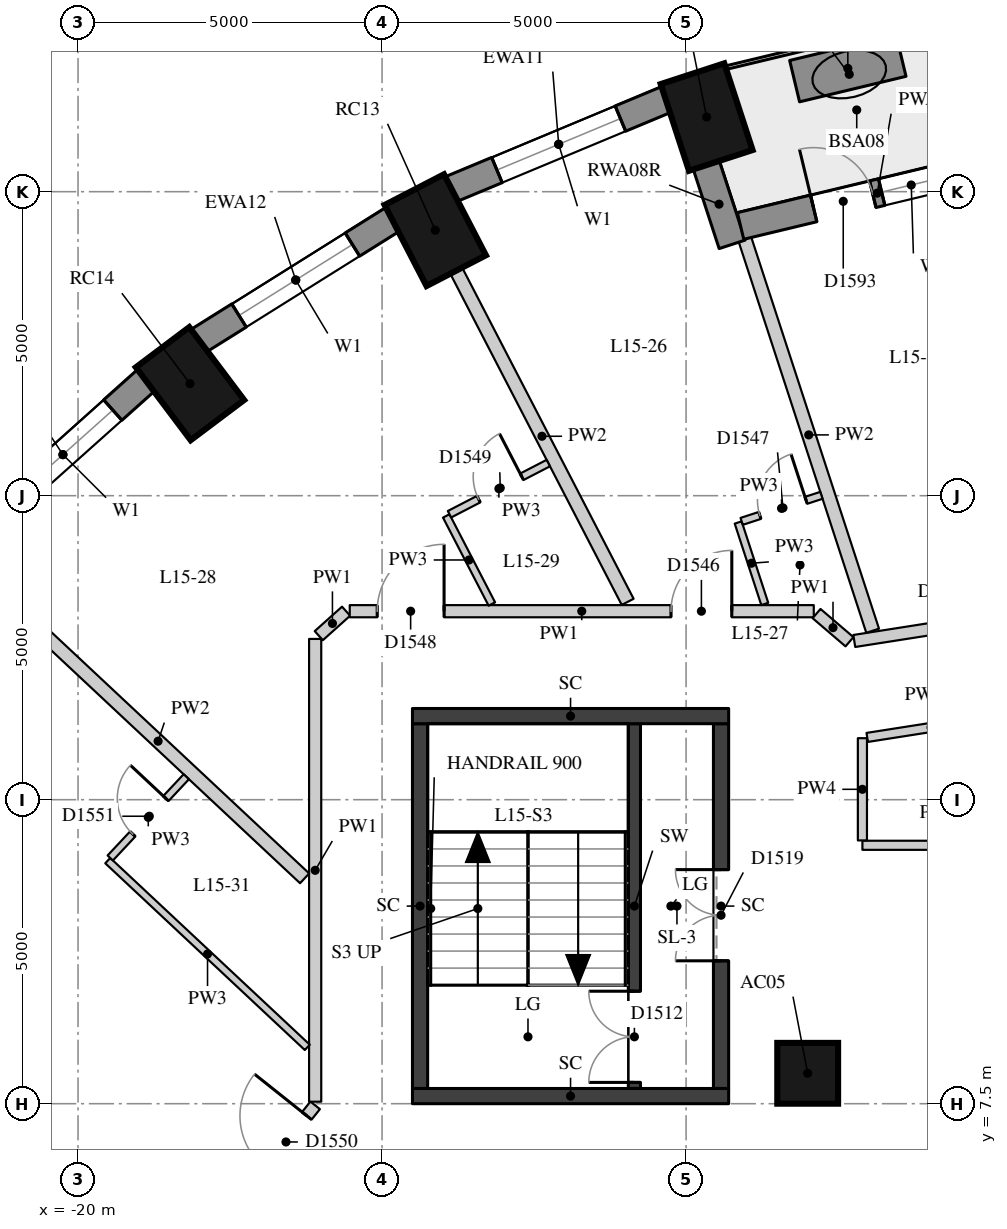
"""IFC4 building model, lengths in metres.
Left out: names, types, materials, properties, quantities, classifications, styles, units other than length and angle.
Written with IfcOpenShell. Run it as: python <this file> out.ifc"""

import sys

from ifc_helpers import new_model, si_unit, direction, frame, frame_2d, origin, origin_2d, place, context, subcontext, project, spatial, rectangle, extrude, element, fill, save


model = new_model("IFC4")
c1 = context("Model", 3, precision=1e-05, world=origin(), true_north=direction((0.0, 1.0)))
c2 = subcontext(c1, "Body", "Model", "MODEL_VIEW")
j1 = project(units=[si_unit("LENGTHUNIT", "METRE"), si_unit("PLANEANGLEUNIT", "RADIAN")], contexts=[c1])
p1 = place(None, origin())
s1 = spatial("IfcSite", under=j1, at=p1, CompositionType="ELEMENT")
p2 = place(p1, origin())
s2 = spatial("IfcBuilding", under=s1, at=p2, CompositionType="ELEMENT")
p3 = place(p2, frame((0.0, 0.0, 58.0)))
s3 = spatial("IfcBuildingStorey", under=s2, at=p3, CompositionType="ELEMENT", Elevation=58.0)
for number, where, z_axis, x_axis in (
    (1, (-9.662, 23.727, 0.0), (0.0, 0.0, 1.0), (-0.31, 0.951, 0.0)),
    (2, (-14.125, 21.867, 0.0), (0.0, 0.0, 1.0), (-0.46, 0.888, 0.0)),
    (3, (-18.159, 19.343, 0.0), (0.0, 0.0, 1.0), (-0.601, 0.799, 0.0)),
):
    element("IfcColumn", number, at=place(p3, frame(where, z_axis=z_axis, x_axis=x_axis)), inside=s3, PredefinedType="COLUMN", context=c2, shape_type="SweptSolid", body=[
        extrude(rectangle(XDim=1.5, YDim=1.1, at=origin_2d()), origin(), (0.0, 0.0, 1.0), 3.3),
    ])
p4 = place(p3, frame((-8.0, 8.0, 0.0), z_axis=(0.0, 0.0, 1.0), x_axis=(1.0, 0.0, 0.0)))
e4 = element("IfcColumn", 4, at=p4, inside=s3, PredefinedType="COLUMN", context=c2, shape_type="SweptSolid", body=[
    extrude(rectangle(XDim=1.0, YDim=1.0, at=origin_2d()), origin(), (0.0, 0.0, 1.0), 3.3),
])
p5 = place(p3, frame((-10.315, 24.021, 0.0), z_axis=(0.0, 0.0, 1.0), x_axis=(-0.923031964282, -0.384723267966, 0.0)))
e5 = element("IfcWall", 5, at=p5, inside=s3, PredefinedType="SOLIDWALL", context=c2, shape_type="SweptSolid", body=[
    extrude(rectangle(XDim=3.856, YDim=0.45, at=frame_2d((1.928, 0.0))), origin(), (0.0, 0.0, 1.0), 3.02),
])
p6 = place(p5, frame((0.828, 0.0, 0.4)))
e6 = element("IfcOpeningElement", 6, at=p6, cuts=e5, PredefinedType="OPENING", context=c2, shape_type="SweptSolid", body=[
    extrude(rectangle(XDim=2.2, YDim=1.75, at=frame_2d((1.1, 0.875))), frame((0.0, 0.235, 0.0), z_axis=(0.0, -1.0, 0.0), x_axis=(1.0, 0.0, 0.0)), (0.0, 0.0, 1.0), 0.47),
])
p7 = place(p3, frame((-14.817, 22.051, 0.0), z_axis=(0.0, 0.0, 1.0), x_axis=(-0.847635480093, -0.530579016629, 0.0)))
e7 = element("IfcWall", 7, at=p7, inside=s3, PredefinedType="SOLIDWALL", context=c2, shape_type="SweptSolid", body=[
    extrude(rectangle(XDim=3.782, YDim=0.45, at=frame_2d((1.891, 0.0))), origin(), (0.0, 0.0, 1.0), 3.02),
])
p8 = place(p7, frame((0.791, 0.0, 0.4)))
e8 = element("IfcOpeningElement", 8, at=p8, cuts=e7, PredefinedType="OPENING", context=c2, shape_type="SweptSolid", body=[
    extrude(rectangle(XDim=2.2, YDim=1.75, at=frame_2d((1.1, 0.875))), frame((0.0, 0.235, 0.0), z_axis=(0.0, -1.0, 0.0), x_axis=(1.0, 0.0, 0.0)), (0.0, 0.0, 1.0), 0.47),
])
p9 = place(p3, frame((-18.871, 19.407, 0.0), z_axis=(0.0, 0.0, 1.0), x_axis=(-0.745526233716, -0.66647628228, 0.0)))
e9 = element("IfcWall", 9, at=p9, inside=s3, PredefinedType="SOLIDWALL", context=c2, shape_type="SweptSolid", body=[
    extrude(rectangle(XDim=3.697, YDim=0.45, at=frame_2d((1.848, 0.0))), origin(), (0.0, 0.0, 1.0), 3.02),
])
p10 = place(p9, frame((0.749, 0.0, 0.4)))
e10 = element("IfcOpeningElement", 10, at=p10, cuts=e9, PredefinedType="OPENING", context=c2, shape_type="SweptSolid", body=[
    extrude(rectangle(XDim=2.2, YDim=1.75, at=frame_2d((1.1, 0.875))), frame((0.0, 0.235, 0.0), z_axis=(0.0, -1.0, 0.0), x_axis=(1.0, 0.0, 0.0)), (0.0, 0.0, 1.0), 0.47),
])
p11 = place(p3, frame((-9.674, 22.956, 0.0), z_axis=(0.0, 0.0, 1.0), x_axis=(0.310269011655, -0.950648799719, 0.0)))
e11 = element("IfcWall", 11, at=p11, inside=s3, PredefinedType="SOLIDWALL", context=c2, shape_type="SweptSolid", body=[
    extrude(rectangle(XDim=1.39, YDim=0.45, at=frame_2d((0.695, 0.0))), origin(), (0.0, 0.0, 1.0), 3.02),
])
p12 = place(p3, frame((-4.608, 23.016, 0.0), z_axis=(0.0, 0.0, 1.0), x_axis=(-0.972343667289, -0.233554688847, 0.0)))
e12 = element("IfcWall", 12, at=p12, inside=s3, PredefinedType="SOLIDWALL", context=c2, shape_type="SweptSolid", body=[
    extrude(rectangle(XDim=4.624, YDim=0.45, at=frame_2d((2.312, 0.0))), origin(), (0.0, 0.0, 1.0), 3.02),
])
p13 = place(p12, frame((1.237, 0.0, 0.4)))
e13 = element("IfcOpeningElement", 13, at=p13, cuts=e12, PredefinedType="OPENING", context=c2, shape_type="SweptSolid", body=[
    extrude(rectangle(XDim=1.0, YDim=1.75, at=frame_2d((0.5, 0.875))), frame((0.0, 0.235, 0.0), z_axis=(0.0, -1.0, 0.0), x_axis=(1.0, 0.0, 0.0)), (0.0, 0.0, 1.0), 0.47),
])
p14 = place(p12, frame((2.387, 0.0, 0.0)))
e14 = element("IfcOpeningElement", 14, at=p14, cuts=e12, PredefinedType="OPENING", context=c2, shape_type="SweptSolid", body=[
    extrude(rectangle(XDim=1.0, YDim=2.15, at=frame_2d((0.5, 1.075))), frame((0.0, 0.235, 0.0), z_axis=(0.0, -1.0, 0.0), x_axis=(1.0, 0.0, 0.0)), (0.0, 0.0, 1.0), 0.47),
])
p15 = place(p3, frame((-6.465, 24.737, 0.0), z_axis=(0.0, 0.0, 1.0), x_axis=(-0.972504142103, -0.232885580473, 0.0)))
e15 = element("IfcWall", 15, at=p15, inside=s3, PredefinedType="USERDEFINED", context=c2, shape_type="SweptSolid", body=[
    extrude(rectangle(XDim=1.8, YDim=0.7, at=frame_2d((0.9, 0.0))), origin(), (0.0, 0.0, 1.0), 0.75),
])
p16 = place(p3, frame((-10.85, 7.75, 0.0), z_axis=(0.0, 0.0, 1.0), x_axis=(0.0, 1.0, 0.0)))
e16 = element("IfcWall", 16, at=p16, inside=s3, PredefinedType="SHEAR", context=c2, shape_type="SweptSolid", body=[
    extrude(rectangle(XDim=6.0, YDim=0.2, at=frame_2d((3.0, 0.0))), origin(), (0.0, 0.0, 1.0), 3.02),
])
p17 = place(p16, frame((0.1, 0.0, 0.0)))
e17 = element("IfcOpeningElement", 17, at=p17, cuts=e16, PredefinedType="OPENING", context=c2, shape_type="SweptSolid", body=[
    extrude(rectangle(XDim=1.5, YDim=2.1, at=frame_2d((0.75, 1.05))), frame((0.0, 0.11, 0.0), z_axis=(0.0, -1.0, 0.0), x_axis=(1.0, 0.0, 0.0)), (0.0, 0.0, 1.0), 0.22),
])
p18 = place(p3, frame((-14.375, 7.75, -0.28), z_axis=(0.0, 0.0, 1.0), x_axis=(0.0, 1.0, 0.0)))
e18 = element("IfcWall", 18, at=p18, inside=s3, PredefinedType="SHEAR", context=c2, shape_type="SweptSolid", body=[
    extrude(rectangle(XDim=6.0, YDim=0.25, at=frame_2d((3.0, 0.0))), origin(), (0.0, 0.0, 1.0), 3.3),
])
p19 = place(p3, frame((-9.425, 7.75, -0.28), z_axis=(0.0, 0.0, 1.0), x_axis=(0.0, 1.0, 0.0)))
e19 = element("IfcWall", 19, at=p19, inside=s3, PredefinedType="SHEAR", context=c2, shape_type="SweptSolid", body=[
    extrude(rectangle(XDim=6.0, YDim=0.25, at=frame_2d((3.0, 0.0))), origin(), (0.0, 0.0, 1.0), 3.3),
])
p20 = place(p19, frame((2.1, 0.0, 0.28)))
e20 = element("IfcOpeningElement", 20, at=p20, cuts=e19, PredefinedType="OPENING", context=c2, shape_type="SweptSolid", body=[
    extrude(rectangle(XDim=1.5, YDim=2.1, at=frame_2d((0.75, 1.05))), frame((0.0, 0.135, 0.0), z_axis=(0.0, -1.0, 0.0), x_axis=(1.0, 0.0, 0.0)), (0.0, 0.0, 1.0), 0.27),
])
for number, where, z_axis, x_axis in (
    (21, (-14.5, 13.875, -0.28), (0.0, 0.0, 1.0), (1.0, 0.0, 0.0)),
    (22, (-14.5, 7.625, -0.28), (0.0, 0.0, 1.0), (1.0, 0.0, 0.0)),
):
    element("IfcWall", number, at=place(p3, frame(where, z_axis=z_axis, x_axis=x_axis)), inside=s3, PredefinedType="SHEAR", context=c2, shape_type="SweptSolid", body=[
        extrude(rectangle(XDim=5.2, YDim=0.25, at=frame_2d((2.6, 0.0))), origin(), (0.0, 0.0, 1.0), 3.3),
    ])
p21 = place(p3, frame((-19.789, 2.844, 0.0), z_axis=(0.0, 0.0, 1.0), x_axis=(0.623300670662, 0.781982272147, 0.0)))
e23 = element("IfcWall", 23, at=p21, inside=s3, PredefinedType="PARTITIONING", context=c2, shape_type="SweptSolid", body=[
    extrude(rectangle(XDim=5.919, YDim=0.2, at=frame_2d((2.959, 0.0))), origin(), (0.0, 0.0, 1.0), 3.02),
])
p22 = place(p21, frame((4.599, 0.0, 0.0)))
e24 = element("IfcOpeningElement", 24, at=p22, cuts=e23, PredefinedType="OPENING", context=c2, shape_type="SweptSolid", body=[
    extrude(rectangle(XDim=1.1, YDim=2.1, at=frame_2d((0.55, 1.05))), frame((0.0, 0.11, 0.0), z_axis=(0.0, -1.0, 0.0), x_axis=(1.0, 0.0, 0.0)), (0.0, 0.0, 1.0), 0.22),
])
p23 = place(p3, frame((-16.1, 7.533, 0.0), z_axis=(0.0, 0.0, 1.0), x_axis=(0.0, 1.0, 0.0)))
e25 = element("IfcWall", 25, at=p23, inside=s3, PredefinedType="PARTITIONING", context=c2, shape_type="SweptSolid", body=[
    extrude(rectangle(XDim=7.611, YDim=0.2, at=frame_2d((3.806, 0.0))), origin(), (0.0, 0.0, 1.0), 3.02),
])
p24 = place(p3, frame((-16.041, 15.198, 0.0), z_axis=(0.0, 0.0, 1.0), x_axis=(0.744722115519, 0.667374685359, 0.0)))
e26 = element("IfcWall", 26, at=p24, inside=s3, PredefinedType="PARTITIONING", context=c2, shape_type="SweptSolid", body=[
    extrude(rectangle(XDim=0.603, YDim=0.2, at=frame_2d((0.301, 0.0))), origin(), (0.0, 0.0, 1.0), 3.02),
])
p25 = place(p3, frame((-15.531, 15.6, 0.0), z_axis=(0.0, 0.0, 1.0), x_axis=(1.0, 0.0, 0.0)))
e27 = element("IfcWall", 27, at=p25, inside=s3, PredefinedType="PARTITIONING", context=c2, shape_type="SweptSolid", body=[
    extrude(rectangle(XDim=7.632, YDim=0.2, at=frame_2d((3.816, 0.0))), origin(), (0.0, 0.0, 1.0), 3.02),
])
p26 = place(p25, frame((5.283, 0.0, 0.0)))
e28 = element("IfcOpeningElement", 28, at=p26, cuts=e27, PredefinedType="OPENING", context=c2, shape_type="SweptSolid", body=[
    extrude(rectangle(XDim=1.0, YDim=2.1, at=frame_2d((0.5, 1.05))), frame((0.0, 0.11, 0.0), z_axis=(0.0, -1.0, 0.0), x_axis=(1.0, 0.0, 0.0)), (0.0, 0.0, 1.0), 0.22),
])
p27 = place(p25, frame((0.451, 0.0, 0.0)))
e29 = element("IfcOpeningElement", 29, at=p27, cuts=e27, PredefinedType="OPENING", context=c2, shape_type="SweptSolid", body=[
    extrude(rectangle(XDim=1.1, YDim=2.1, at=frame_2d((0.55, 1.05))), frame((0.0, 0.11, 0.0), z_axis=(0.0, -1.0, 0.0), x_axis=(1.0, 0.0, 0.0)), (0.0, 0.0, 1.0), 0.22),
])
p28 = place(p3, frame((-7.854, 15.561, 0.0), z_axis=(0.0, 0.0, 1.0), x_axis=(0.759763914627, -0.650199041856, 0.0)))
e30 = element("IfcWall", 30, at=p28, inside=s3, PredefinedType="PARTITIONING", context=c2, shape_type="SweptSolid", body=[
    extrude(rectangle(XDim=0.713, YDim=0.2, at=frame_2d((0.356, 0.0))), origin(), (0.0, 0.0, 1.0), 3.02),
])
p29 = place(p3, frame((-7.234, 15.11, 0.0), z_axis=(0.0, 0.0, 1.0), x_axis=(0.987957763282, 0.154723811906, 0.0)))
e31 = element("IfcWall", 31, at=p29, inside=s3, PredefinedType="PARTITIONING", context=c2, shape_type="SweptSolid", body=[
    extrude(rectangle(XDim=11.012, YDim=0.2, at=frame_2d((5.506, 0.0))), origin(), (0.0, 0.0, 1.0), 3.02),
])
p30 = place(p29, frame((8.605, 0.0, 0.0)))
e32 = element("IfcOpeningElement", 32, at=p30, cuts=e31, PredefinedType="OPENING", context=c2, shape_type="SweptSolid", body=[
    extrude(rectangle(XDim=0.9, YDim=2.1, at=frame_2d((0.45, 1.05))), frame((0.0, 0.11, 0.0), z_axis=(0.0, -1.0, 0.0), x_axis=(1.0, 0.0, 0.0)), (0.0, 0.0, 1.0), 0.22),
])
p31 = place(p29, frame((5.116, 0.0, 0.0)))
e33 = element("IfcOpeningElement", 33, at=p31, cuts=e31, PredefinedType="OPENING", context=c2, shape_type="SweptSolid", body=[
    extrude(rectangle(XDim=0.9, YDim=2.1, at=frame_2d((0.45, 1.05))), frame((0.0, 0.11, 0.0), z_axis=(0.0, -1.0, 0.0), x_axis=(1.0, 0.0, 0.0)), (0.0, 0.0, 1.0), 0.22),
])
p32 = place(p29, frame((1.626, 0.0, 0.0)))
e34 = element("IfcOpeningElement", 34, at=p32, cuts=e31, PredefinedType="OPENING", context=c2, shape_type="SweptSolid", body=[
    extrude(rectangle(XDim=0.9, YDim=2.1, at=frame_2d((0.45, 1.05))), frame((0.0, 0.11, 0.0), z_axis=(0.0, -1.0, 0.0), x_axis=(1.0, 0.0, 0.0)), (0.0, 0.0, 1.0), 0.22),
])
p33 = place(p3, frame((-4.58, 11.75, 0.0), z_axis=(0.0, 0.0, 1.0), x_axis=(-1.0, 0.0, 0.0)))
e35 = element("IfcWall", 35, at=p33, inside=s3, PredefinedType="PARTITIONING", context=c2, shape_type="SweptSolid", body=[
    extrude(rectangle(XDim=2.52, YDim=0.15, at=frame_2d((1.26, 0.0))), origin(), (0.0, 0.0, 1.0), 3.02),
])
p34 = place(p3, frame((-7.1, 11.83, 0.0), z_axis=(0.0, 0.0, 1.0), x_axis=(0.0, 1.0, 0.0)))
e36 = element("IfcWall", 36, at=p34, inside=s3, PredefinedType="PARTITIONING", context=c2, shape_type="SweptSolid", body=[
    extrude(rectangle(XDim=1.681, YDim=0.15, at=frame_2d((0.841, 0.0))), origin(), (0.0, 0.0, 1.0), 3.02),
])
p35 = place(p3, frame((-7.021, 13.524, 0.0), z_axis=(0.0, 0.0, 1.0), x_axis=(0.987976394461, 0.154604799366, 0.0)))
e37 = element("IfcWall", 37, at=p35, inside=s3, PredefinedType="PARTITIONING", context=c2, shape_type="SweptSolid", body=[
    extrude(rectangle(XDim=2.124, YDim=0.15, at=frame_2d((1.062, 0.0))), origin(), (0.0, 0.0, 1.0), 2.57),
])
p36 = place(p3, frame((-9.034, 21.721, 0.0), z_axis=(0.0, 0.0, 1.0), x_axis=(0.310212430052, -0.950667264736, 0.0)))
e38 = element("IfcWall", 38, at=p36, inside=s3, PredefinedType="PARTITIONING", context=c2, shape_type="SweptSolid", body=[
    extrude(rectangle(XDim=6.777, YDim=0.22, at=frame_2d((3.388, 0.0))), origin(), (0.0, 0.0, 1.0), 3.02),
])
p37 = place(p3, frame((-13.78, 21.201, 0.0), z_axis=(0.0, 0.0, 1.0), x_axis=(0.459699000582, -0.888074787878, 0.0)))
e39 = element("IfcWall", 39, at=p37, inside=s3, PredefinedType="PARTITIONING", context=c2, shape_type="SweptSolid", body=[
    extrude(rectangle(XDim=6.134, YDim=0.22, at=frame_2d((3.067, 0.0))), origin(), (0.0, 0.0, 1.0), 3.02),
])
p38 = place(p3, frame((-21.093, 15.718, 0.0), z_axis=(0.0, 0.0, 1.0), x_axis=(0.73009284205, -0.683347965525, 0.0)))
e40 = element("IfcWall", 40, at=p38, inside=s3, PredefinedType="PARTITIONING", context=c2, shape_type="SweptSolid", body=[
    extrude(rectangle(XDim=6.602, YDim=0.22, at=frame_2d((3.301, 0.0))), origin(), (0.0, 0.0, 1.0), 3.02),
])
p39 = place(p3, frame((-8.706, 15.719, 0.0), z_axis=(0.0, 0.0, 1.0), x_axis=(-0.310245242974, 0.950656556918, 0.0)))
e41 = element("IfcWall", 41, at=p39, inside=s3, PredefinedType="PARTITIONING", context=c2, shape_type="SweptSolid", body=[
    extrude(rectangle(XDim=1.409, YDim=0.12, at=frame_2d((0.705, 0.0))), origin(), (0.0, 0.0, 1.0), 3.02),
])
p40 = place(p3, frame((-13.194, 15.718, 0.0), z_axis=(0.0, 0.0, 1.0), x_axis=(-0.459736274936, 0.888055492359, 0.0)))
e42 = element("IfcWall", 42, at=p40, inside=s3, PredefinedType="PARTITIONING", context=c2, shape_type="SweptSolid", body=[
    extrude(rectangle(XDim=1.632, YDim=0.12, at=frame_2d((0.816, 0.0))), origin(), (0.0, 0.0, 1.0), 3.02),
])
p41 = place(p3, frame((-16.229, 8.426, 0.0), z_axis=(0.0, 0.0, 1.0), x_axis=(-0.730077325201, 0.683364543438, 0.0)))
e43 = element("IfcWall", 43, at=p41, inside=s3, PredefinedType="PARTITIONING", context=c2, shape_type="SweptSolid", body=[
    extrude(rectangle(XDim=4.495, YDim=0.12, at=frame_2d((2.247, 0.0))), origin(), (0.0, 0.0, 1.0), 3.02),
])
p42 = place(p3, frame((-9.086, 17.077, 0.0), z_axis=(0.0, 0.0, 1.0), x_axis=(0.950576687533, 0.310489872812, 0.0)))
e44 = element("IfcWall", 44, at=p42, inside=s3, PredefinedType="PARTITIONING", context=c2, shape_type="SweptSolid", body=[
    extrude(rectangle(XDim=1.38, YDim=0.12, at=frame_2d((0.69, 0.0))), origin(), (0.0, 0.0, 1.0), 3.02),
])
p43 = place(p42, frame((0.315, 0.0, 0.0)))
e45 = element("IfcOpeningElement", 45, at=p43, cuts=e44, PredefinedType="OPENING", context=c2, shape_type="SweptSolid", body=[
    extrude(rectangle(XDim=0.8, YDim=2.1, at=frame_2d((0.4, 1.05))), frame((0.0, 0.07, 0.0), z_axis=(0.0, -1.0, 0.0), x_axis=(1.0, 0.0, 0.0)), (0.0, 0.0, 1.0), 0.14),
])
p44 = place(p3, frame((-13.891, 17.195, 0.0), z_axis=(0.0, 0.0, 1.0), x_axis=(0.88806930088, 0.459709600546, 0.0)))
e46 = element("IfcWall", 46, at=p44, inside=s3, PredefinedType="PARTITIONING", context=c2, shape_type="SweptSolid", body=[
    extrude(rectangle(XDim=1.83, YDim=0.12, at=frame_2d((0.915, 0.0))), origin(), (0.0, 0.0, 1.0), 3.02),
])
p45 = place(p44, frame((0.54, 0.0, 0.0)))
e47 = element("IfcOpeningElement", 47, at=p45, cuts=e46, PredefinedType="OPENING", context=c2, shape_type="SweptSolid", body=[
    extrude(rectangle(XDim=0.8, YDim=2.1, at=frame_2d((0.4, 1.05))), frame((0.0, 0.07, 0.0), z_axis=(0.0, -1.0, 0.0), x_axis=(1.0, 0.0, 0.0)), (0.0, 0.0, 1.0), 0.14),
])
p46 = place(p3, frame((-19.47, 11.542, 0.0), z_axis=(0.0, 0.0, 1.0), x_axis=(0.683306289544, 0.730131847456, 0.0)))
e48 = element("IfcWall", 48, at=p46, inside=s3, PredefinedType="PARTITIONING", context=c2, shape_type="SweptSolid", body=[
    extrude(rectangle(XDim=1.83, YDim=0.12, at=frame_2d((0.915, 0.0))), origin(), (0.0, 0.0, 1.0), 3.02),
])
p47 = place(p46, frame((0.54, 0.0, 0.0)))
e49 = element("IfcOpeningElement", 49, at=p47, cuts=e48, PredefinedType="OPENING", context=c2, shape_type="SweptSolid", body=[
    extrude(rectangle(XDim=0.8, YDim=2.1, at=frame_2d((0.4, 1.05))), frame((0.0, 0.07, 0.0), z_axis=(0.0, -1.0, 0.0), x_axis=(1.0, 0.0, 0.0)), (0.0, 0.0, 1.0), 0.14),
])
p48 = place(p6, origin())
e50 = element("IfcWindow", 50, at=p48, inside=s3, PartitioningType="SINGLE_PANEL", PredefinedType="WINDOW", context=c2, shape_type="SweptSolid", body=[
    extrude(rectangle(XDim=2.2, YDim=1.75, at=frame_2d((1.1, 0.875))), frame((0.0, 0.035, 0.0), z_axis=(0.0, -1.0, 0.0), x_axis=(1.0, 0.0, 0.0)), (0.0, 0.0, 1.0), 0.06),
])
fill(e6, e50)
p49 = place(p8, origin())
e51 = element("IfcWindow", 51, at=p49, inside=s3, PartitioningType="SINGLE_PANEL", PredefinedType="WINDOW", context=c2, shape_type="SweptSolid", body=[
    extrude(rectangle(XDim=2.2, YDim=1.75, at=frame_2d((1.1, 0.875))), frame((0.0, 0.035, 0.0), z_axis=(0.0, -1.0, 0.0), x_axis=(1.0, 0.0, 0.0)), (0.0, 0.0, 1.0), 0.06),
])
fill(e8, e51)
p50 = place(p10, origin())
e52 = element("IfcWindow", 52, at=p50, inside=s3, PartitioningType="SINGLE_PANEL", PredefinedType="WINDOW", context=c2, shape_type="SweptSolid", body=[
    extrude(rectangle(XDim=2.2, YDim=1.75, at=frame_2d((1.1, 0.875))), frame((0.0, 0.035, 0.0), z_axis=(0.0, -1.0, 0.0), x_axis=(1.0, 0.0, 0.0)), (0.0, 0.0, 1.0), 0.06),
])
fill(e10, e52)
p51 = place(p13, origin())
e53 = element("IfcWindow", 53, at=p51, inside=s3, PartitioningType="SINGLE_PANEL", PredefinedType="WINDOW", context=c2, shape_type="SweptSolid", body=[
    extrude(rectangle(XDim=1.0, YDim=1.75, at=frame_2d((0.5, 0.875))), frame((0.0, 0.035, 0.0), z_axis=(0.0, -1.0, 0.0), x_axis=(1.0, 0.0, 0.0)), (0.0, 0.0, 1.0), 0.06),
])
fill(e13, e53)
p52 = place(p14, frame((1.0, 0.0, 0.0), z_axis=(0.0, 0.0, 1.0), x_axis=(-1.0, 0.0, 0.0)))
e54 = element("IfcDoor", 54, at=p52, inside=s3, OperationType="SINGLE_SWING_LEFT", PredefinedType="DOOR", context=c2, shape_type="SweptSolid", body=[
    extrude(rectangle(XDim=1.0, YDim=2.15, at=frame_2d((0.5, 1.075))), frame((0.0, 0.075, 0.0), z_axis=(0.0, -1.0, 0.0), x_axis=(1.0, 0.0, 0.0)), (0.0, 0.0, 1.0), 0.05),
])
fill(e14, e54)
p53 = place(p17, origin())
e55 = element("IfcDoor", 55, at=p53, inside=s3, OperationType="DOUBLE_DOOR_SINGLE_SWING", PredefinedType="DOOR", context=c2, shape_type="SweptSolid", body=[
    extrude(rectangle(XDim=1.5, YDim=2.1, at=frame_2d((0.75, 1.05))), frame((0.0, 0.025, 0.0), z_axis=(0.0, -1.0, 0.0), x_axis=(1.0, 0.0, 0.0)), (0.0, 0.0, 1.0), 0.05),
])
fill(e17, e55)
p54 = place(p20, origin())
e56 = element("IfcDoor", 56, at=p54, inside=s3, OperationType="DOUBLE_DOOR_SINGLE_SWING", PredefinedType="DOOR", context=c2, shape_type="SweptSolid", body=[
    extrude(rectangle(XDim=1.5, YDim=2.1, at=frame_2d((0.75, 1.05))), frame((0.0, 0.025, 0.0), z_axis=(0.0, -1.0, 0.0), x_axis=(1.0, 0.0, 0.0)), (0.0, 0.0, 1.0), 0.05),
])
fill(e20, e56)
p55 = place(p26, origin())
e57 = element("IfcDoor", 57, at=p55, inside=s3, OperationType="SINGLE_SWING_RIGHT", PredefinedType="DOOR", context=c2, shape_type="SweptSolid", body=[
    extrude(rectangle(XDim=1.0, YDim=2.1, at=frame_2d((0.5, 1.05))), frame((0.0, 0.025, 0.0), z_axis=(0.0, -1.0, 0.0), x_axis=(1.0, 0.0, 0.0)), (0.0, 0.0, 1.0), 0.05),
])
fill(e28, e57)
p56 = place(p43, origin())
e58 = element("IfcDoor", 58, at=p56, inside=s3, OperationType="SINGLE_SWING_RIGHT", PredefinedType="DOOR", context=c2, shape_type="SweptSolid", body=[
    extrude(rectangle(XDim=0.8, YDim=2.1, at=frame_2d((0.4, 1.05))), frame((0.0, 0.025, 0.0), z_axis=(0.0, -1.0, 0.0), x_axis=(1.0, 0.0, 0.0)), (0.0, 0.0, 1.0), 0.05),
])
fill(e45, e58)
p57 = place(p27, origin())
e59 = element("IfcDoor", 59, at=p57, inside=s3, OperationType="SINGLE_SWING_RIGHT", PredefinedType="DOOR", context=c2, shape_type="SweptSolid", body=[
    extrude(rectangle(XDim=1.1, YDim=2.1, at=frame_2d((0.55, 1.05))), frame((0.0, 0.025, 0.0), z_axis=(0.0, -1.0, 0.0), x_axis=(1.0, 0.0, 0.0)), (0.0, 0.0, 1.0), 0.05),
])
fill(e29, e59)
p58 = place(p45, origin())
e60 = element("IfcDoor", 60, at=p58, inside=s3, OperationType="SINGLE_SWING_RIGHT", PredefinedType="DOOR", context=c2, shape_type="SweptSolid", body=[
    extrude(rectangle(XDim=0.8, YDim=2.1, at=frame_2d((0.4, 1.05))), frame((0.0, 0.025, 0.0), z_axis=(0.0, -1.0, 0.0), x_axis=(1.0, 0.0, 0.0)), (0.0, 0.0, 1.0), 0.05),
])
fill(e47, e60)
p59 = place(p22, origin())
e61 = element("IfcDoor", 61, at=p59, inside=s3, OperationType="SINGLE_SWING_RIGHT", PredefinedType="DOOR", context=c2, shape_type="SweptSolid", body=[
    extrude(rectangle(XDim=1.1, YDim=2.1, at=frame_2d((0.55, 1.05))), frame((0.0, 0.025, 0.0), z_axis=(0.0, -1.0, 0.0), x_axis=(1.0, 0.0, 0.0)), (0.0, 0.0, 1.0), 0.05),
])
fill(e24, e61)
p60 = place(p47, origin())
e62 = element("IfcDoor", 62, at=p60, inside=s3, OperationType="SINGLE_SWING_RIGHT", PredefinedType="DOOR", context=c2, shape_type="SweptSolid", body=[
    extrude(rectangle(XDim=0.8, YDim=2.1, at=frame_2d((0.4, 1.05))), frame((0.0, 0.025, 0.0), z_axis=(0.0, -1.0, 0.0), x_axis=(1.0, 0.0, 0.0)), (0.0, 0.0, 1.0), 0.05),
])
fill(e49, e62)
save(model, sys.argv[1])
